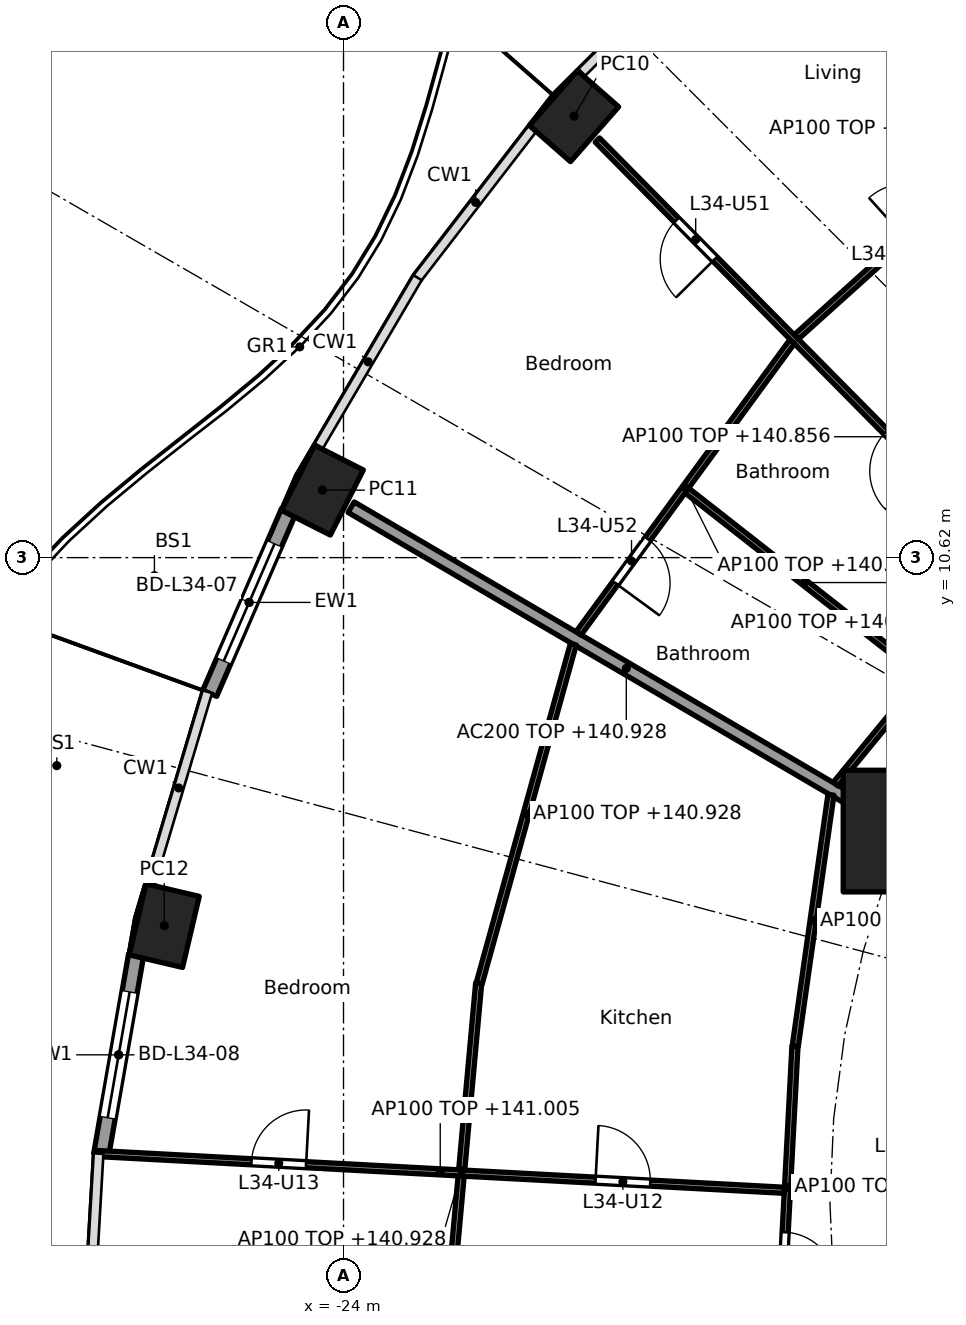
"""IFC4 building model, lengths in metres.
Left out: names, types, materials, properties, quantities, classifications, styles, units other than length and angle.
Written with IfcOpenShell. Run it as: python <this file> out.ifc"""

import sys

from ifc_helpers import new_model, si_unit, direction, frame, frame_2d, origin, origin_2d, place, context, subcontext, project, spatial, rectangle, hollow_rectangle, extrude, element, fill, save


model = new_model("IFC4")
c1 = context("Model", 3, precision=1e-05, world=origin(), true_north=direction((0.0, 1.0)))
c2 = subcontext(c1, "Body", "Model", "MODEL_VIEW")
j1 = project(units=[si_unit("LENGTHUNIT", "METRE"), si_unit("PLANEANGLEUNIT", "RADIAN")], contexts=[c1])
p1 = place(None, origin())
s1 = spatial("IfcSite", under=j1, at=p1, CompositionType="ELEMENT")
p2 = place(p1, origin())
s2 = spatial("IfcBuilding", under=s1, at=p2, CompositionType="ELEMENT")
p3 = place(p2, frame((0.0, 0.0, 138.1)))
s3 = spatial("IfcBuildingStorey", under=s2, at=p3, CompositionType="ELEMENT", Elevation=138.1)
for number, where, z_axis, x_axis in (
    (1, (-20.209, 17.88, 0.0), (0.0, 0.0, 1.0), (-0.66, -0.751, 0.0)),
    (2, (-24.347, 11.73, 0.0), (0.0, 0.0, 1.0), (-0.452, -0.892, 0.0)),
    (3, (-26.948, 4.568, 0.0), (0.0, 0.0, 1.0), (-0.229, -0.973, 0.0)),
):
    element("IfcColumn", number, at=place(p3, frame(where, z_axis=z_axis, x_axis=x_axis)), inside=s3, PredefinedType="COLUMN", context=c2, shape_type="SweptSolid", body=[
        extrude(hollow_rectangle(XDim=1.2, YDim=0.9, WallThickness=0.04, at=origin_2d()), origin(), (0.0, 0.0, 1.0), 3.7),
    ])
p4 = place(p3, frame((-14.782, 6.123, 0.0), z_axis=(0.0, 0.0, 1.0), x_axis=(1.0, 0.0, 0.0)))
e4 = element("IfcColumn", 4, at=p4, inside=s3, PredefinedType="COLUMN", context=c2, shape_type="SweptSolid", body=[
    extrude(rectangle(XDim=2.0, YDim=2.0, at=origin_2d()), origin(), (0.0, 0.0, 1.0), 3.7),
])
p5 = place(p3, frame((-26.2, 8.388, 0.0), z_axis=(0.0, 0.0, 1.0), x_axis=(0.397638954585, 0.917541967321, 0.0)))
e5 = element("IfcWall", 5, at=p5, inside=s3, PredefinedType="SOLIDWALL", context=c2, shape_type="SweptSolid", body=[
    extrude(rectangle(XDim=3.261, YDim=0.25, at=frame_2d((1.63, 0.0))), origin(), (0.0, 0.0, 1.0), 3.44),
])
p6 = place(p5, frame((0.58, 0.0, 0.0)))
e6 = element("IfcOpeningElement", 6, at=p6, cuts=e5, PredefinedType="OPENING", context=c2, shape_type="SweptSolid", body=[
    extrude(rectangle(XDim=2.1, YDim=2.4, at=frame_2d((1.05, 1.2))), frame((0.0, 0.135, 0.0), z_axis=(0.0, -1.0, 0.0), x_axis=(1.0, 0.0, 0.0)), (0.0, 0.0, 1.0), 0.27),
])
p7 = place(p3, frame((-27.985, 0.802, 0.0), z_axis=(0.0, 0.0, 1.0), x_axis=(0.172163521006, 0.985068384446, 0.0)))
e7 = element("IfcWall", 7, at=p7, inside=s3, PredefinedType="SOLIDWALL", context=c2, shape_type="SweptSolid", body=[
    extrude(rectangle(XDim=3.333, YDim=0.25, at=frame_2d((1.666, 0.0))), origin(), (0.0, 0.0, 1.0), 3.44),
])
p8 = place(p7, frame((0.616, 0.0, 0.0)))
e8 = element("IfcOpeningElement", 8, at=p8, cuts=e7, PredefinedType="OPENING", context=c2, shape_type="SweptSolid", body=[
    extrude(rectangle(XDim=2.1, YDim=2.4, at=frame_2d((1.05, 1.2))), frame((0.0, 0.135, 0.0), z_axis=(0.0, -1.0, 0.0), x_axis=(1.0, 0.0, 0.0)), (0.0, 0.0, 1.0), 0.27),
])
p9 = place(p3, frame((-14.825, 6.148, 0.0), z_axis=(0.0, 0.0, 1.0), x_axis=(-0.862852031662, 0.505456597006, 0.0)))
e9 = element("IfcWall", 9, at=p9, inside=s3, PredefinedType="PARTITIONING", context=c2, shape_type="SweptSolid", body=[
    extrude(rectangle(XDim=10.487, YDim=0.2, at=frame_2d((5.244, 0.0))), origin(), (0.0, 0.0, 1.0), 2.828),
])
p10 = place(p3, frame((-12.289, 18.089, 0.0), z_axis=(0.0, 0.0, 1.0), x_axis=(-0.743146066164, -0.669129228435, 0.0)))
e10 = element("IfcWall", 10, at=p10, inside=s3, PredefinedType="PARTITIONING", context=c2, shape_type="SweptSolid", body=[
    extrude(rectangle(XDim=5.739, YDim=0.1, at=frame_2d((2.87, 0.0))), origin(), (0.0, 0.0, 1.0), 2.828),
])
p11 = place(p10, frame((2.42, 0.0, 0.0)))
e11 = element("IfcOpeningElement", 11, at=p11, cuts=e10, PredefinedType="OPENING", context=c2, shape_type="SweptSolid", body=[
    extrude(rectangle(XDim=0.9, YDim=2.1, at=frame_2d((0.45, 1.05))), frame((0.0, 0.06, 0.0), z_axis=(0.0, -1.0, 0.0), x_axis=(1.0, 0.0, 0.0)), (0.0, 0.0, 1.0), 0.12),
])
p12 = place(p3, frame((-10.182, 7.729, 0.0), z_axis=(0.0, 0.0, 1.0), x_axis=(-0.702930219229, 0.7112588185, 0.0)))
e12 = element("IfcWall", 12, at=p12, inside=s3, PredefinedType="PARTITIONING", context=c2, shape_type="SweptSolid", body=[
    extrude(rectangle(XDim=13.719, YDim=0.1, at=frame_2d((6.859, 0.0))), origin(), (0.0, 0.0, 1.0), 2.756),
])
p13 = place(p12, frame((1.507, 0.0, 0.0)))
e13 = element("IfcOpeningElement", 13, at=p13, cuts=e12, PredefinedType="OPENING", context=c2, shape_type="SweptSolid", body=[
    extrude(rectangle(XDim=0.9, YDim=2.1, at=frame_2d((0.45, 1.05))), frame((0.0, 0.06, 0.0), z_axis=(0.0, -1.0, 0.0), x_axis=(1.0, 0.0, 0.0)), (0.0, 0.0, 1.0), 0.12),
])
p14 = place(p12, frame((6.067, 0.0, 0.0)))
e14 = element("IfcOpeningElement", 14, at=p14, cuts=e12, PredefinedType="OPENING", context=c2, shape_type="SweptSolid", body=[
    extrude(rectangle(XDim=0.9, YDim=2.1, at=frame_2d((0.45, 1.05))), frame((0.0, 0.06, 0.0), z_axis=(0.0, -1.0, 0.0), x_axis=(1.0, 0.0, 0.0)), (0.0, 0.0, 1.0), 0.12),
])
p15 = place(p12, frame((10.969, 0.0, 0.0)))
e15 = element("IfcOpeningElement", 15, at=p15, cuts=e12, PredefinedType="OPENING", context=c2, shape_type="SweptSolid", body=[
    extrude(rectangle(XDim=0.9, YDim=2.1, at=frame_2d((0.45, 1.05))), frame((0.0, 0.06, 0.0), z_axis=(0.0, -1.0, 0.0), x_axis=(1.0, 0.0, 0.0)), (0.0, 0.0, 1.0), 0.12),
])
p16 = place(p3, frame((-12.965, 10.475, 0.0), z_axis=(0.0, 0.0, 1.0), x_axis=(-0.634943961338, -0.772558195841, 0.0)))
e16 = element("IfcWall", 16, at=p16, inside=s3, PredefinedType="PARTITIONING", context=c2, shape_type="SweptSolid", body=[
    extrude(rectangle(XDim=4.632, YDim=0.1, at=frame_2d((2.316, 0.0))), origin(), (0.0, 0.0, 1.0), 2.828),
])
p17 = place(p3, frame((-16.621, 14.174, 0.0), z_axis=(0.0, 0.0, 1.0), x_axis=(-0.590674917338, -0.806909624449, 0.0)))
e17 = element("IfcWall", 17, at=p17, inside=s3, PredefinedType="PARTITIONING", context=c2, shape_type="SweptSolid", body=[
    extrude(rectangle(XDim=5.949, YDim=0.1, at=frame_2d((2.975, 0.0))), origin(), (0.0, 0.0, 1.0), 2.828),
])
p18 = place(p17, frame((4.024, 0.0, 0.0)))
e18 = element("IfcOpeningElement", 18, at=p18, cuts=e17, PredefinedType="OPENING", context=c2, shape_type="SweptSolid", body=[
    extrude(rectangle(XDim=0.9, YDim=2.1, at=frame_2d((0.45, 1.05))), frame((0.0, 0.06, 0.0), z_axis=(0.0, -1.0, 0.0), x_axis=(1.0, 0.0, 0.0)), (0.0, 0.0, 1.0), 0.12),
])
p19 = place(p3, frame((-14.491, 8.697, 0.0), z_axis=(0.0, 0.0, 1.0), x_axis=(-0.787139479951, 0.616775031193, 0.0)))
e19 = element("IfcWall", 19, at=p19, inside=s3, PredefinedType="PARTITIONING", context=c2, shape_type="SweptSolid", body=[
    extrude(rectangle(XDim=4.907, YDim=0.1, at=frame_2d((2.453, 0.0))), origin(), (0.0, 0.0, 1.0), 3.44),
])
p20 = place(p3, frame((-15.984, 6.72, 0.0), z_axis=(0.0, 0.0, 1.0), x_axis=(-0.140684869512, -0.990054426529, 0.0)))
e20 = element("IfcWall", 20, at=p20, inside=s3, PredefinedType="PARTITIONING", context=c2, shape_type="SweptSolid", body=[
    extrude(rectangle(XDim=4.177, YDim=0.1, at=frame_2d((2.088, 0.0))), origin(), (0.0, 0.0, 1.0), 2.828),
])
p21 = place(p3, frame((-20.221, 9.197, 0.0), z_axis=(0.0, 0.0, 1.0), x_axis=(-0.267398009191, -0.963586168789, 0.0)))
e21 = element("IfcWall", 21, at=p21, inside=s3, PredefinedType="PARTITIONING", context=c2, shape_type="SweptSolid", body=[
    extrude(rectangle(XDim=5.788, YDim=0.1, at=frame_2d((2.894, 0.0))), origin(), (0.0, 0.0, 1.0), 2.828),
])
p22 = place(p3, frame((-16.576, 2.585, 0.0), z_axis=(0.0, 0.0, 1.0), x_axis=(-0.052509224895, -0.998620439056, 0.0)))
e22 = element("IfcWall", 22, at=p22, inside=s3, PredefinedType="PARTITIONING", context=c2, shape_type="SweptSolid", body=[
    extrude(rectangle(XDim=4.649, YDim=0.1, at=frame_2d((2.325, 0.0))), origin(), (0.0, 0.0, 1.0), 2.828),
])
p23 = place(p22, frame((3.062, 0.0, 0.0)))
e23 = element("IfcOpeningElement", 23, at=p23, cuts=e22, PredefinedType="OPENING", context=c2, shape_type="SweptSolid", body=[
    extrude(rectangle(XDim=0.9, YDim=2.1, at=frame_2d((0.45, 1.05))), frame((0.0, 0.06, 0.0), z_axis=(0.0, -1.0, 0.0), x_axis=(1.0, 0.0, 0.0)), (0.0, 0.0, 1.0), 0.12),
])
p24 = place(p3, frame((-21.777, 3.621, 0.0), z_axis=(0.0, 0.0, 1.0), x_axis=(-0.090606877484, -0.995886737412, 0.0)))
e24 = element("IfcWall", 24, at=p24, inside=s3, PredefinedType="PARTITIONING", context=c2, shape_type="SweptSolid", body=[
    extrude(rectangle(XDim=6.189, YDim=0.1, at=frame_2d((3.095, 0.0))), origin(), (0.0, 0.0, 1.0), 2.828),
])
p25 = place(p3, frame((-16.75, 0.216, 0.0), z_axis=(0.0, 0.0, 1.0), x_axis=(-0.998572054207, 0.053421461579, 0.0)))
e25 = element("IfcWall", 25, at=p25, inside=s3, PredefinedType="PARTITIONING", context=c2, shape_type="SweptSolid", body=[
    extrude(rectangle(XDim=11.334, YDim=0.1, at=frame_2d((5.667, 0.0))), origin(), (0.0, 0.0, 1.0), 2.905),
])
p26 = place(p25, frame((2.209, 0.0, 0.0)))
e26 = element("IfcOpeningElement", 26, at=p26, cuts=e25, PredefinedType="OPENING", context=c2, shape_type="SweptSolid", body=[
    extrude(rectangle(XDim=0.9, YDim=2.1, at=frame_2d((0.45, 1.05))), frame((0.0, 0.06, 0.0), z_axis=(0.0, -1.0, 0.0), x_axis=(1.0, 0.0, 0.0)), (0.0, 0.0, 1.0), 0.12),
])
p27 = place(p25, frame((7.876, 0.0, 0.0)))
e27 = element("IfcOpeningElement", 27, at=p27, cuts=e25, PredefinedType="OPENING", context=c2, shape_type="SweptSolid", body=[
    extrude(rectangle(XDim=0.9, YDim=2.1, at=frame_2d((0.45, 1.05))), frame((0.0, 0.06, 0.0), z_axis=(0.0, -1.0, 0.0), x_axis=(1.0, 0.0, 0.0)), (0.0, 0.0, 1.0), 0.12),
])
p28 = place(p6, origin())
e28 = element("IfcDoor", 28, at=p28, inside=s3, OperationType="SLIDING_TO_LEFT", PredefinedType="DOOR", context=c2, shape_type="SweptSolid", body=[
    extrude(rectangle(XDim=2.1, YDim=2.4, at=frame_2d((1.05, 1.2))), frame((0.0, 0.025, 0.0), z_axis=(0.0, -1.0, 0.0), x_axis=(1.0, 0.0, 0.0)), (0.0, 0.0, 1.0), 0.05),
])
fill(e6, e28)
p29 = place(p8, origin())
e29 = element("IfcDoor", 29, at=p29, inside=s3, OperationType="SLIDING_TO_LEFT", PredefinedType="DOOR", context=c2, shape_type="SweptSolid", body=[
    extrude(rectangle(XDim=2.1, YDim=2.4, at=frame_2d((1.05, 1.2))), frame((0.0, 0.025, 0.0), z_axis=(0.0, -1.0, 0.0), x_axis=(1.0, 0.0, 0.0)), (0.0, 0.0, 1.0), 0.05),
])
fill(e8, e29)
p30 = place(p23, origin())
e30 = element("IfcDoor", 30, at=p30, inside=s3, OperationType="SINGLE_SWING_RIGHT", PredefinedType="DOOR", context=c2, shape_type="SweptSolid", body=[
    extrude(rectangle(XDim=0.9, YDim=2.1, at=frame_2d((0.45, 1.05))), frame((0.0, 0.025, 0.0), z_axis=(0.0, -1.0, 0.0), x_axis=(1.0, 0.0, 0.0)), (0.0, 0.0, 1.0), 0.05),
])
fill(e23, e30)
p31 = place(p26, frame((0.9, 0.0, 0.0), x_axis=(-1.0, 0.0, 0.0)))
e31 = element("IfcDoor", 31, at=p31, inside=s3, OperationType="SINGLE_SWING_LEFT", PredefinedType="DOOR", context=c2, shape_type="SweptSolid", body=[
    extrude(rectangle(XDim=0.9, YDim=2.1, at=frame_2d((0.45, 1.05))), frame((0.0, 0.025, 0.0), z_axis=(0.0, -1.0, 0.0), x_axis=(1.0, 0.0, 0.0)), (0.0, 0.0, 1.0), 0.05),
])
fill(e26, e31)
p32 = place(p27, frame((0.9, 0.0, 0.0), x_axis=(-1.0, 0.0, 0.0)))
e32 = element("IfcDoor", 32, at=p32, inside=s3, OperationType="SINGLE_SWING_RIGHT", PredefinedType="DOOR", context=c2, shape_type="SweptSolid", body=[
    extrude(rectangle(XDim=0.9, YDim=2.1, at=frame_2d((0.45, 1.05))), frame((0.0, 0.025, 0.0), z_axis=(0.0, -1.0, 0.0), x_axis=(1.0, 0.0, 0.0)), (0.0, 0.0, 1.0), 0.05),
])
fill(e27, e32)
p33 = place(p14, origin())
e33 = element("IfcDoor", 33, at=p33, inside=s3, OperationType="SINGLE_SWING_LEFT", PredefinedType="DOOR", context=c2, shape_type="SweptSolid", body=[
    extrude(rectangle(XDim=0.9, YDim=2.1, at=frame_2d((0.45, 1.05))), frame((0.0, 0.025, 0.0), z_axis=(0.0, -1.0, 0.0), x_axis=(1.0, 0.0, 0.0)), (0.0, 0.0, 1.0), 0.05),
])
fill(e14, e33)
p34 = place(p15, origin())
e34 = element("IfcDoor", 34, at=p34, inside=s3, OperationType="SINGLE_SWING_LEFT", PredefinedType="DOOR", context=c2, shape_type="SweptSolid", body=[
    extrude(rectangle(XDim=0.9, YDim=2.1, at=frame_2d((0.45, 1.05))), frame((0.0, 0.025, 0.0), z_axis=(0.0, -1.0, 0.0), x_axis=(1.0, 0.0, 0.0)), (0.0, 0.0, 1.0), 0.05),
])
fill(e15, e34)
p35 = place(p18, origin())
e35 = element("IfcDoor", 35, at=p35, inside=s3, OperationType="SINGLE_SWING_RIGHT", PredefinedType="DOOR", context=c2, shape_type="SweptSolid", body=[
    extrude(rectangle(XDim=0.9, YDim=2.1, at=frame_2d((0.45, 1.05))), frame((0.0, 0.025, 0.0), z_axis=(0.0, -1.0, 0.0), x_axis=(1.0, 0.0, 0.0)), (0.0, 0.0, 1.0), 0.05),
])
fill(e18, e35)
save(model, sys.argv[1])
